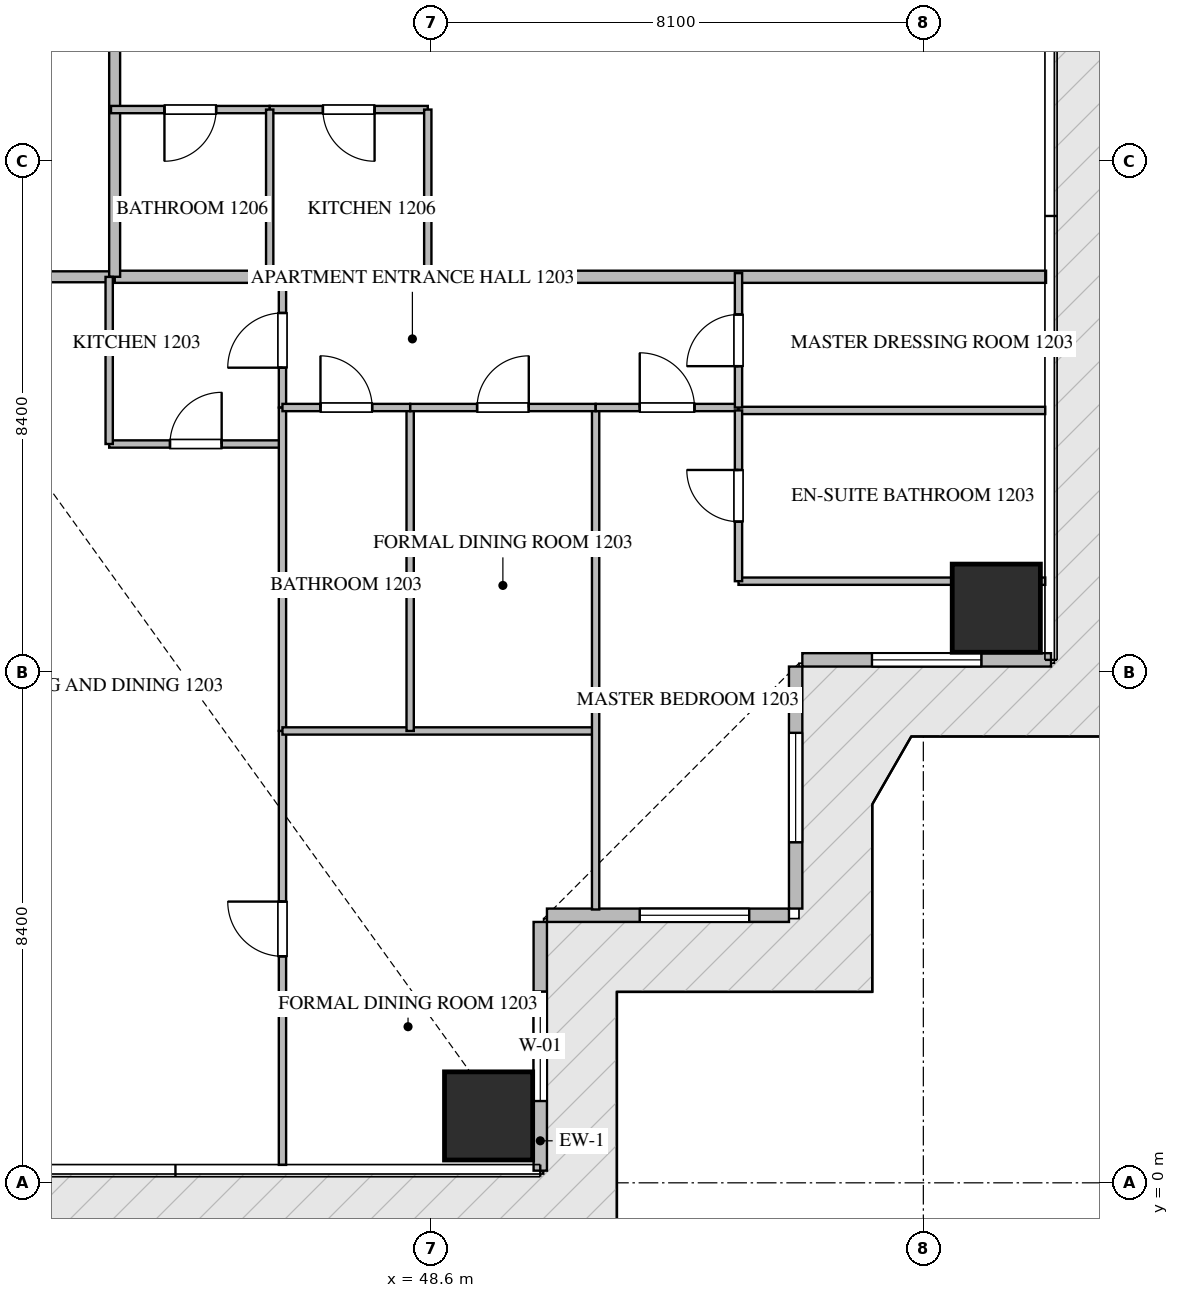
"""IFC4 building model, lengths in metres.
Left out: names, types, materials, properties, quantities, classifications, styles, units other than length and angle.
Written with IfcOpenShell. Run it as: python <this file> out.ifc"""

import sys

from ifc_helpers import new_model, si_unit, direction, frame, frame_2d, origin, origin_2d, place, context, subcontext, project, spatial, rectangle, extrude, source, transform, mapped, element, fill, save


model = new_model("IFC4")
c1 = context("Model", 3, precision=1e-05, world=origin(), true_north=direction((0.0, 1.0)))
c2 = subcontext(c1, "Body", "Model", "MODEL_VIEW")
j1 = project(units=[si_unit("LENGTHUNIT", "METRE"), si_unit("PLANEANGLEUNIT", "RADIAN")], contexts=[c1])
p1 = place(None, origin())
s1 = spatial("IfcSite", under=j1, at=p1, CompositionType="ELEMENT")
p2 = place(p1, origin())
s2 = spatial("IfcBuilding", under=s1, at=p2, CompositionType="ELEMENT")
p3 = place(p2, frame((0.0, 0.0, 52.95)))
s3 = spatial("IfcBuildingStorey", under=s2, at=p3, CompositionType="ELEMENT", Elevation=52.95)
m1 = source(origin(), c2, "Body", "SweptSolid", [
    extrude(rectangle(XDim=1.45, YDim=1.45, at=origin_2d()), origin(), (0.0, 0.0, 1.0), 3.75),
])
for number, where, z_axis, x_axis in (
    (1, (49.55, 1.1, -0.26), (0.0, 0.0, 1.0), (1.0, 0.0, 0.0)),
    (2, (57.9, 9.45, -0.26), (0.0, 0.0, 1.0), (1.0, 0.0, 0.0)),
):
    element("IfcColumn", number, at=place(p3, frame(where, z_axis=z_axis, x_axis=x_axis)), inside=s3, PredefinedType="COLUMN", context=c2, shape_type="MappedRepresentation", body=[
        mapped(m1, transform((0.0, 0.0, 0.0), scale=1.0)),
    ])
p4 = place(p3, frame((50.4, 0.2, 0.0), z_axis=(0.0, 0.0, 1.0), x_axis=(0.0, 1.0, 0.0)))
e3 = element("IfcWall", 3, at=p4, inside=s3, PredefinedType="ELEMENTEDWALL", context=c2, shape_type="SweptSolid", body=[
    extrude(rectangle(XDim=4.09, YDim=0.22, at=frame_2d((2.045, 0.0))), origin(), (0.0, 0.0, 1.0), 3.475),
])
p5 = place(p4, frame((1.145, 0.0, 0.65)))
e4 = element("IfcOpeningElement", 4, at=p5, cuts=e3, PredefinedType="OPENING", context=c2, shape_type="SweptSolid", body=[
    extrude(rectangle(XDim=1.8, YDim=2.1, at=frame_2d((0.9, 1.05))), frame((0.0, 0.12, 0.0), z_axis=(0.0, -1.0, 0.0), x_axis=(1.0, 0.0, 0.0)), (0.0, 0.0, 1.0), 0.24),
])
p6 = place(p3, frame((50.51, 4.4, 0.0), z_axis=(0.0, 0.0, 1.0), x_axis=(1.0, 0.0, 0.0)))
e5 = element("IfcWall", 5, at=p6, inside=s3, PredefinedType="ELEMENTEDWALL", context=c2, shape_type="SweptSolid", body=[
    extrude(rectangle(XDim=3.98, YDim=0.22, at=frame_2d((1.99, 0.0))), origin(), (0.0, 0.0, 1.0), 3.475),
])
p7 = place(p6, frame((1.526, 0.0, 0.65)))
e6 = element("IfcOpeningElement", 6, at=p7, cuts=e5, PredefinedType="OPENING", context=c2, shape_type="SweptSolid", body=[
    extrude(rectangle(XDim=1.8, YDim=2.1, at=frame_2d((0.9, 1.05))), frame((0.0, 0.12, 0.0), z_axis=(0.0, -1.0, 0.0), x_axis=(1.0, 0.0, 0.0)), (0.0, 0.0, 1.0), 0.24),
])
p8 = place(p3, frame((54.6, 4.51, 0.0), z_axis=(0.0, 0.0, 1.0), x_axis=(0.0, 1.0, 0.0)))
e7 = element("IfcWall", 7, at=p8, inside=s3, PredefinedType="ELEMENTEDWALL", context=c2, shape_type="SweptSolid", body=[
    extrude(rectangle(XDim=3.98, YDim=0.22, at=frame_2d((1.99, 0.0))), origin(), (0.0, 0.0, 1.0), 3.475),
])
p9 = place(p8, frame((1.09, 0.0, 0.65)))
e8 = element("IfcOpeningElement", 8, at=p9, cuts=e7, PredefinedType="OPENING", context=c2, shape_type="SweptSolid", body=[
    extrude(rectangle(XDim=1.8, YDim=2.1, at=frame_2d((0.9, 1.05))), frame((0.0, 0.12, 0.0), z_axis=(0.0, -1.0, 0.0), x_axis=(1.0, 0.0, 0.0)), (0.0, 0.0, 1.0), 0.24),
])
p10 = place(p3, frame((54.71, 8.6, 0.0), z_axis=(0.0, 0.0, 1.0), x_axis=(1.0, 0.0, 0.0)))
e9 = element("IfcWall", 9, at=p10, inside=s3, PredefinedType="ELEMENTEDWALL", context=c2, shape_type="SweptSolid", body=[
    extrude(rectangle(XDim=4.09, YDim=0.22, at=frame_2d((2.045, 0.0))), origin(), (0.0, 0.0, 1.0), 3.475),
])
p11 = place(p10, frame((1.145, 0.0, 0.65)))
e10 = element("IfcOpeningElement", 10, at=p11, cuts=e9, PredefinedType="OPENING", context=c2, shape_type="SweptSolid", body=[
    extrude(rectangle(XDim=1.8, YDim=2.1, at=frame_2d((0.9, 1.05))), frame((0.0, 0.12, 0.0), z_axis=(0.0, -1.0, 0.0), x_axis=(1.0, 0.0, 0.0)), (0.0, 0.0, 1.0), 0.24),
])
p12 = place(p3, frame((43.4, 14.9, 0.0), z_axis=(0.0, 0.0, 1.0), x_axis=(1.0, 0.0, 0.0)))
e11 = element("IfcWall", 11, at=p12, inside=s3, PredefinedType="PARTITIONING", context=c2, shape_type="SweptSolid", body=[
    extrude(rectangle(XDim=15.318, YDim=0.2, at=frame_2d((7.659, 0.0))), origin(), (0.0, 0.0, 1.0), 3.49),
])
p13 = place(p3, frame((21.402, 14.9, 0.0), z_axis=(0.0, 0.0, 1.0), x_axis=(1.0, 0.0, 0.0)))
e12 = element("IfcWall", 12, at=p13, inside=s3, PredefinedType="PARTITIONING", context=c2, shape_type="SweptSolid", body=[
    extrude(rectangle(XDim=21.996, YDim=0.18, at=frame_2d((10.998, 0.0))), origin(), (0.0, 0.0, 1.0), 3.49),
])
p14 = place(p13, frame((2.1, 0.0, 0.0)))
e13 = element("IfcOpeningElement", 13, at=p14, cuts=e12, PredefinedType="OPENING", context=c2, shape_type="SweptSolid", body=[
    extrude(rectangle(XDim=1.0, YDim=2.15, at=frame_2d((0.5, 1.075))), frame((0.0, 0.1, 0.0), z_axis=(0.0, -1.0, 0.0), x_axis=(1.0, 0.0, 0.0)), (0.0, 0.0, 1.0), 0.2),
])
p15 = place(p13, frame((14.172, 0.0, 0.0)))
e14 = element("IfcOpeningElement", 14, at=p15, cuts=e12, PredefinedType="OPENING", context=c2, shape_type="SweptSolid", body=[
    extrude(rectangle(XDim=1.0, YDim=2.15, at=frame_2d((0.5, 1.075))), frame((0.0, 0.1, 0.0), z_axis=(0.0, -1.0, 0.0), x_axis=(1.0, 0.0, 0.0)), (0.0, 0.0, 1.0), 0.2),
])
p16 = place(p13, frame((18.896, 0.0, 0.0)))
e15 = element("IfcOpeningElement", 15, at=p16, cuts=e12, PredefinedType="OPENING", context=c2, shape_type="SweptSolid", body=[
    extrude(rectangle(XDim=1.0, YDim=2.15, at=frame_2d((0.5, 1.075))), frame((0.0, 0.1, 0.0), z_axis=(0.0, -1.0, 0.0), x_axis=(1.0, 0.0, 0.0)), (0.0, 0.0, 1.0), 0.2),
])
p17 = place(p3, frame((43.4, 14.9, 0.0), z_axis=(0.0, 0.0, 1.0), x_axis=(0.0, 1.0, 0.0)))
e16 = element("IfcWall", 16, at=p17, inside=s3, PredefinedType="PARTITIONING", context=c2, shape_type="SweptSolid", body=[
    extrude(rectangle(XDim=20.6, YDim=0.18, at=frame_2d((10.3, 0.0))), origin(), (0.0, 0.0, 1.0), 3.49),
])
p18 = place(p17, frame((5.821, 0.0, 0.0)))
e17 = element("IfcOpeningElement", 17, at=p18, cuts=e16, PredefinedType="OPENING", context=c2, shape_type="SweptSolid", body=[
    extrude(rectangle(XDim=1.0, YDim=2.15, at=frame_2d((0.5, 1.075))), frame((0.0, 0.1, 0.0), z_axis=(0.0, -1.0, 0.0), x_axis=(1.0, 0.0, 0.0)), (0.0, 0.0, 1.0), 0.2),
])
p19 = place(p17, frame((10.898, 0.0, 0.0)))
e18 = element("IfcOpeningElement", 18, at=p19, cuts=e16, PredefinedType="OPENING", context=c2, shape_type="SweptSolid", body=[
    extrude(rectangle(XDim=1.0, YDim=2.15, at=frame_2d((0.5, 1.075))), frame((0.0, 0.1, 0.0), z_axis=(0.0, -1.0, 0.0), x_axis=(1.0, 0.0, 0.0)), (0.0, 0.0, 1.0), 0.2),
])
p20 = place(p3, frame((43.31, 12.15, 0.0), z_axis=(0.0, 0.0, 1.0), x_axis=(1.0, 0.0, 0.0)))
e19 = element("IfcWall", 19, at=p20, inside=s3, PredefinedType="PARTITIONING", context=c2, shape_type="SweptSolid", body=[
    extrude(rectangle(XDim=2.85, YDim=0.12, at=frame_2d((1.425, 0.0))), origin(), (0.0, 0.0, 1.0), 3.49),
])
p21 = place(p20, frame((1.0, 0.0, 0.0)))
e20 = element("IfcOpeningElement", 20, at=p21, cuts=e19, PredefinedType="OPENING", context=c2, shape_type="SweptSolid", body=[
    extrude(rectangle(XDim=0.85, YDim=2.1, at=frame_2d((0.425, 1.05))), frame((0.0, 0.07, 0.0), z_axis=(0.0, -1.0, 0.0), x_axis=(1.0, 0.0, 0.0)), (0.0, 0.0, 1.0), 0.14),
])
p22 = place(p3, frame((43.31, 12.15, 0.0), z_axis=(0.0, 0.0, 1.0), x_axis=(0.0, 1.0, 0.0)))
e21 = element("IfcWall", 21, at=p22, inside=s3, PredefinedType="PARTITIONING", context=c2, shape_type="SweptSolid", body=[
    extrude(rectangle(XDim=2.748, YDim=0.12, at=frame_2d((1.374, 0.0))), origin(), (0.0, 0.0, 1.0), 3.49),
])
p23 = place(p3, frame((46.16, 12.75, 0.0), z_axis=(0.0, 0.0, 1.0), x_axis=(0.0, 1.0, 0.0)))
e22 = element("IfcWall", 22, at=p23, inside=s3, PredefinedType="PARTITIONING", context=c2, shape_type="SweptSolid", body=[
    extrude(rectangle(XDim=2.21, YDim=0.12, at=frame_2d((1.105, 0.0))), origin(), (0.0, 0.0, 1.0), 3.49),
])
p24 = place(p23, frame((0.655, 0.0, 0.0)))
e23 = element("IfcOpeningElement", 23, at=p24, cuts=e22, PredefinedType="OPENING", context=c2, shape_type="SweptSolid", body=[
    extrude(rectangle(XDim=0.9, YDim=2.1, at=frame_2d((0.45, 1.05))), frame((0.0, 0.07, 0.0), z_axis=(0.0, -1.0, 0.0), x_axis=(1.0, 0.0, 0.0)), (0.0, 0.0, 1.0), 0.14),
])
p25 = place(p3, frame((46.16, 0.295, 0.0), z_axis=(0.0, 0.0, 1.0), x_axis=(0.0, 1.0, 0.0)))
e24 = element("IfcWall", 24, at=p25, inside=s3, PredefinedType="PARTITIONING", context=c2, shape_type="SweptSolid", body=[
    extrude(rectangle(XDim=7.136, YDim=0.12, at=frame_2d((3.568, 0.0))), origin(), (0.0, 0.0, 1.0), 3.49),
])
p26 = place(p25, frame((3.43, 0.0, 0.0)))
e25 = element("IfcOpeningElement", 25, at=p26, cuts=e24, PredefinedType="OPENING", context=c2, shape_type="SweptSolid", body=[
    extrude(rectangle(XDim=0.9, YDim=2.1, at=frame_2d((0.45, 1.05))), frame((0.0, 0.07, 0.0), z_axis=(0.0, -1.0, 0.0), x_axis=(1.0, 0.0, 0.0)), (0.0, 0.0, 1.0), 0.14),
])
p27 = place(p3, frame((46.16, 7.433, 0.0), z_axis=(0.0, 0.0, 1.0), x_axis=(0.0, 1.0, 0.0)))
e26 = element("IfcWall", 26, at=p27, inside=s3, PredefinedType="PARTITIONING", context=c2, shape_type="SweptSolid", body=[
    extrude(rectangle(XDim=5.315, YDim=0.12, at=frame_2d((2.657, 0.0))), origin(), (0.0, 0.0, 1.0), 3.49),
])
p28 = place(p3, frame((46.16, 7.431, 0.0), z_axis=(0.0, 0.0, 1.0), x_axis=(1.0, 0.0, 0.0)))
e27 = element("IfcWall", 27, at=p28, inside=s3, PredefinedType="PARTITIONING", context=c2, shape_type="SweptSolid", body=[
    extrude(rectangle(XDim=5.15, YDim=0.12, at=frame_2d((2.575, 0.0))), origin(), (0.0, 0.0, 1.0), 3.49),
])
p29 = place(p3, frame((51.31, 4.495, 0.0), z_axis=(0.0, 0.0, 1.0), x_axis=(0.0, 1.0, 0.0)))
e28 = element("IfcWall", 28, at=p29, inside=s3, PredefinedType="PARTITIONING", context=c2, shape_type="SweptSolid", body=[
    extrude(rectangle(XDim=8.255, YDim=0.12, at=frame_2d((4.127, 0.0))), origin(), (0.0, 0.0, 1.0), 3.49),
])
p30 = place(p3, frame((48.26, 7.431, 0.0), z_axis=(0.0, 0.0, 1.0), x_axis=(0.0, 1.0, 0.0)))
e29 = element("IfcWall", 29, at=p30, inside=s3, PredefinedType="PARTITIONING", context=c2, shape_type="SweptSolid", body=[
    extrude(rectangle(XDim=5.319, YDim=0.12, at=frame_2d((2.66, 0.0))), origin(), (0.0, 0.0, 1.0), 3.49),
])
p31 = place(p3, frame((46.16, 12.75, 0.0), z_axis=(0.0, 0.0, 1.0), x_axis=(1.0, 0.0, 0.0)))
e30 = element("IfcWall", 30, at=p31, inside=s3, PredefinedType="PARTITIONING", context=c2, shape_type="SweptSolid", body=[
    extrude(rectangle(XDim=2.1, YDim=0.12, at=frame_2d((1.05, 0.0))), origin(), (0.0, 0.0, 1.0), 3.49),
])
p32 = place(p31, frame((0.625, 0.0, 0.0)))
e31 = element("IfcOpeningElement", 31, at=p32, cuts=e30, PredefinedType="OPENING", context=c2, shape_type="SweptSolid", body=[
    extrude(rectangle(XDim=0.85, YDim=2.1, at=frame_2d((0.425, 1.05))), frame((0.0, 0.07, 0.0), z_axis=(0.0, -1.0, 0.0), x_axis=(1.0, 0.0, 0.0)), (0.0, 0.0, 1.0), 0.14),
])
p33 = place(p3, frame((48.262, 12.75, 0.0), z_axis=(0.0, 0.0, 1.0), x_axis=(1.0, 0.0, 0.0)))
e32 = element("IfcWall", 32, at=p33, inside=s3, PredefinedType="PARTITIONING", context=c2, shape_type="SweptSolid", body=[
    extrude(rectangle(XDim=3.048, YDim=0.12, at=frame_2d((1.524, 0.0))), origin(), (0.0, 0.0, 1.0), 3.49),
])
p34 = place(p33, frame((1.099, 0.0, 0.0)))
e33 = element("IfcOpeningElement", 33, at=p34, cuts=e32, PredefinedType="OPENING", context=c2, shape_type="SweptSolid", body=[
    extrude(rectangle(XDim=0.85, YDim=2.1, at=frame_2d((0.425, 1.05))), frame((0.0, 0.07, 0.0), z_axis=(0.0, -1.0, 0.0), x_axis=(1.0, 0.0, 0.0)), (0.0, 0.0, 1.0), 0.14),
])
p35 = place(p3, frame((51.312, 12.75, 0.0), z_axis=(0.0, 0.0, 1.0), x_axis=(1.0, 0.0, 0.0)))
e34 = element("IfcWall", 34, at=p35, inside=s3, PredefinedType="PARTITIONING", context=c2, shape_type="SweptSolid", body=[
    extrude(rectangle(XDim=2.348, YDim=0.12, at=frame_2d((1.174, 0.0))), origin(), (0.0, 0.0, 1.0), 3.49),
])
p36 = place(p35, frame((0.724, 0.0, 0.0)))
e35 = element("IfcOpeningElement", 35, at=p36, cuts=e34, PredefinedType="OPENING", context=c2, shape_type="SweptSolid", body=[
    extrude(rectangle(XDim=0.9, YDim=2.1, at=frame_2d((0.45, 1.05))), frame((0.0, 0.07, 0.0), z_axis=(0.0, -1.0, 0.0), x_axis=(1.0, 0.0, 0.0)), (0.0, 0.0, 1.0), 0.14),
])
p37 = place(p3, frame((53.66, 9.894, 0.0), z_axis=(0.0, 0.0, 1.0), x_axis=(1.0, 0.0, 0.0)))
e36 = element("IfcWall", 36, at=p37, inside=s3, PredefinedType="PARTITIONING", context=c2, shape_type="SweptSolid", body=[
    extrude(rectangle(XDim=5.045, YDim=0.12, at=frame_2d((2.522, 0.0))), origin(), (0.0, 0.0, 1.0), 3.49),
])
p38 = place(p3, frame((53.662, 12.702, 0.0), z_axis=(0.0, 0.0, 1.0), x_axis=(1.0, 0.0, 0.0)))
e37 = element("IfcWall", 37, at=p38, inside=s3, PredefinedType="PARTITIONING", context=c2, shape_type="SweptSolid", body=[
    extrude(rectangle(XDim=5.043, YDim=0.12, at=frame_2d((2.521, 0.0))), origin(), (0.0, 0.0, 1.0), 3.49),
])
p39 = place(p3, frame((53.66, 9.894, 0.0), z_axis=(0.0, 0.0, 1.0), x_axis=(0.0, 1.0, 0.0)))
e38 = element("IfcWall", 38, at=p39, inside=s3, PredefinedType="PARTITIONING", context=c2, shape_type="SweptSolid", body=[
    extrude(rectangle(XDim=2.808, YDim=0.12, at=frame_2d((1.404, 0.0))), origin(), (0.0, 0.0, 1.0), 3.49),
])
p40 = place(p39, frame((0.979, 0.0, 0.0)))
e39 = element("IfcOpeningElement", 39, at=p40, cuts=e38, PredefinedType="OPENING", context=c2, shape_type="SweptSolid", body=[
    extrude(rectangle(XDim=0.85, YDim=2.1, at=frame_2d((0.425, 1.05))), frame((0.0, 0.07, 0.0), z_axis=(0.0, -1.0, 0.0), x_axis=(1.0, 0.0, 0.0)), (0.0, 0.0, 1.0), 0.14),
])
p41 = place(p3, frame((53.66, 12.75, 0.0), z_axis=(0.0, 0.0, 1.0), x_axis=(0.0, 1.0, 0.0)))
e40 = element("IfcWall", 40, at=p41, inside=s3, PredefinedType="PARTITIONING", context=c2, shape_type="SweptSolid", body=[
    extrude(rectangle(XDim=2.21, YDim=0.12, at=frame_2d((1.105, 0.0))), origin(), (0.0, 0.0, 1.0), 3.49),
])
p42 = place(p41, frame((0.68, 0.0, 0.0)))
e41 = element("IfcOpeningElement", 41, at=p42, cuts=e40, PredefinedType="OPENING", context=c2, shape_type="SweptSolid", body=[
    extrude(rectangle(XDim=0.85, YDim=2.1, at=frame_2d((0.425, 1.05))), frame((0.0, 0.07, 0.0), z_axis=(0.0, -1.0, 0.0), x_axis=(1.0, 0.0, 0.0)), (0.0, 0.0, 1.0), 0.14),
])
p43 = place(p3, frame((48.55, 17.65, 0.0), z_axis=(0.0, 0.0, 1.0), x_axis=(-1.0, 0.0, 0.0)))
e42 = element("IfcWall", 42, at=p43, inside=s3, PredefinedType="PARTITIONING", context=c2, shape_type="SweptSolid", body=[
    extrude(rectangle(XDim=2.6, YDim=0.12, at=frame_2d((1.3, 0.0))), origin(), (0.0, 0.0, 1.0), 3.49),
])
p44 = place(p43, frame((0.875, 0.0, 0.0)))
e43 = element("IfcOpeningElement", 43, at=p44, cuts=e42, PredefinedType="OPENING", context=c2, shape_type="SweptSolid", body=[
    extrude(rectangle(XDim=0.85, YDim=2.1, at=frame_2d((0.425, 1.05))), frame((0.0, 0.07, 0.0), z_axis=(0.0, -1.0, 0.0), x_axis=(1.0, 0.0, 0.0)), (0.0, 0.0, 1.0), 0.14),
])
p45 = place(p3, frame((45.948, 17.65, 0.0), z_axis=(0.0, 0.0, 1.0), x_axis=(-1.0, 0.0, 0.0)))
e44 = element("IfcWall", 44, at=p45, inside=s3, PredefinedType="PARTITIONING", context=c2, shape_type="SweptSolid", body=[
    extrude(rectangle(XDim=2.608, YDim=0.12, at=frame_2d((1.304, 0.0))), origin(), (0.0, 0.0, 1.0), 3.49),
])
p46 = place(p45, frame((0.879, 0.0, 0.0)))
e45 = element("IfcOpeningElement", 45, at=p46, cuts=e44, PredefinedType="OPENING", context=c2, shape_type="SweptSolid", body=[
    extrude(rectangle(XDim=0.85, YDim=2.1, at=frame_2d((0.425, 1.05))), frame((0.0, 0.07, 0.0), z_axis=(0.0, -1.0, 0.0), x_axis=(1.0, 0.0, 0.0)), (0.0, 0.0, 1.0), 0.14),
])
for number, where, z_axis, x_axis in (
    (46, (45.95, 14.84, 0.0), (0.0, 0.0, 1.0), (0.0, 1.0, 0.0)),
    (47, (48.55, 14.84, 0.0), (0.0, 0.0, 1.0), (0.0, 1.0, 0.0)),
):
    element("IfcWall", number, at=place(p3, frame(where, z_axis=z_axis, x_axis=x_axis)), inside=s3, PredefinedType="PARTITIONING", context=c2, shape_type="SweptSolid", body=[
        extrude(rectangle(XDim=2.81, YDim=0.12, at=frame_2d((1.405, 0.0))), origin(), (0.0, 0.0, 1.0), 3.49),
    ])
m2 = source(origin(), c2, "Body", "SweptSolid", [
    extrude(rectangle(XDim=1.8, YDim=2.1, at=frame_2d((0.9, 1.05))), frame((0.0, 0.03, 0.0), z_axis=(0.0, -1.0, 0.0), x_axis=(1.0, 0.0, 0.0)), (0.0, 0.0, 1.0), 0.06),
])
p47 = place(p5, origin())
e48 = element("IfcWindow", 48, at=p47, inside=s3, PartitioningType="SINGLE_PANEL", PredefinedType="WINDOW", context=c2, shape_type="MappedRepresentation", body=[
    mapped(m2, transform((0.0, 0.0, 0.0), scale=1.0)),
])
fill(e4, e48)
p48 = place(p7, origin())
e49 = element("IfcWindow", 49, at=p48, inside=s3, PartitioningType="SINGLE_PANEL", PredefinedType="WINDOW", context=c2, shape_type="MappedRepresentation", body=[
    mapped(m2, transform((0.0, 0.0, 0.0), scale=1.0)),
])
fill(e6, e49)
p49 = place(p9, origin())
e50 = element("IfcWindow", 50, at=p49, inside=s3, PartitioningType="SINGLE_PANEL", PredefinedType="WINDOW", context=c2, shape_type="MappedRepresentation", body=[
    mapped(m2, transform((0.0, 0.0, 0.0), scale=1.0)),
])
fill(e8, e50)
p50 = place(p11, origin())
e51 = element("IfcWindow", 51, at=p50, inside=s3, PartitioningType="SINGLE_PANEL", PredefinedType="WINDOW", context=c2, shape_type="MappedRepresentation", body=[
    mapped(m2, transform((0.0, 0.0, 0.0), scale=1.0)),
])
fill(e10, e51)
m3 = source(origin(), c2, "Body", "SweptSolid", [
    extrude(rectangle(XDim=0.85, YDim=2.1, at=frame_2d((0.425, 1.05))), frame((0.0, 0.025, 0.0), z_axis=(0.0, -1.0, 0.0), x_axis=(1.0, 0.0, 0.0)), (0.0, 0.0, 1.0), 0.05),
])
p51 = place(p21, origin())
e52 = element("IfcDoor", 52, at=p51, inside=s3, OperationType="SINGLE_SWING_RIGHT", PredefinedType="DOOR", context=c2, shape_type="MappedRepresentation", body=[
    mapped(m3, transform((0.0, 0.0, 0.0), scale=1.0)),
])
fill(e20, e52)
m4 = source(origin(), c2, "Body", "SweptSolid", [
    extrude(rectangle(XDim=0.9, YDim=2.1, at=frame_2d((0.45, 1.05))), frame((0.0, 0.025, 0.0), z_axis=(0.0, -1.0, 0.0), x_axis=(1.0, 0.0, 0.0)), (0.0, 0.0, 1.0), 0.05),
])
p52 = place(p24, origin())
e53 = element("IfcDoor", 53, at=p52, inside=s3, OperationType="SINGLE_SWING_LEFT", PredefinedType="DOOR", context=c2, shape_type="MappedRepresentation", body=[
    mapped(m4, transform((0.0, 0.0, 0.0), scale=1.0)),
])
fill(e23, e53)
p53 = place(p26, origin())
e54 = element("IfcDoor", 54, at=p53, inside=s3, OperationType="SINGLE_SWING_RIGHT", PredefinedType="DOOR", context=c2, shape_type="MappedRepresentation", body=[
    mapped(m4, transform((0.0, 0.0, 0.0), scale=1.0)),
])
fill(e25, e54)
p54 = place(p32, origin())
e55 = element("IfcDoor", 55, at=p54, inside=s3, OperationType="SINGLE_SWING_LEFT", PredefinedType="DOOR", context=c2, shape_type="MappedRepresentation", body=[
    mapped(m3, transform((0.0, 0.0, 0.0), scale=1.0)),
])
fill(e31, e55)
p55 = place(p34, origin())
e56 = element("IfcDoor", 56, at=p55, inside=s3, OperationType="SINGLE_SWING_RIGHT", PredefinedType="DOOR", context=c2, shape_type="MappedRepresentation", body=[
    mapped(m3, transform((0.0, 0.0, 0.0), scale=1.0)),
])
fill(e33, e56)
p56 = place(p36, origin())
e57 = element("IfcDoor", 57, at=p56, inside=s3, OperationType="SINGLE_SWING_LEFT", PredefinedType="DOOR", context=c2, shape_type="MappedRepresentation", body=[
    mapped(m4, transform((0.0, 0.0, 0.0), scale=1.0)),
])
fill(e35, e57)
p57 = place(p40, origin())
e58 = element("IfcDoor", 58, at=p57, inside=s3, OperationType="SINGLE_SWING_RIGHT", PredefinedType="DOOR", context=c2, shape_type="MappedRepresentation", body=[
    mapped(m3, transform((0.0, 0.0, 0.0), scale=1.0)),
])
fill(e39, e58)
p58 = place(p42, origin())
e59 = element("IfcDoor", 59, at=p58, inside=s3, OperationType="SINGLE_SWING_LEFT", PredefinedType="DOOR", context=c2, shape_type="MappedRepresentation", body=[
    mapped(m3, transform((0.0, 0.0, 0.0), scale=1.0)),
])
fill(e41, e59)
p59 = place(p44, origin())
e60 = element("IfcDoor", 60, at=p59, inside=s3, OperationType="SINGLE_SWING_LEFT", PredefinedType="DOOR", context=c2, shape_type="MappedRepresentation", body=[
    mapped(m3, transform((0.0, 0.0, 0.0), scale=1.0)),
])
fill(e43, e60)
p60 = place(p46, origin())
e61 = element("IfcDoor", 61, at=p60, inside=s3, OperationType="SINGLE_SWING_RIGHT", PredefinedType="DOOR", context=c2, shape_type="MappedRepresentation", body=[
    mapped(m3, transform((0.0, 0.0, 0.0), scale=1.0)),
])
fill(e45, e61)
save(model, sys.argv[1])
